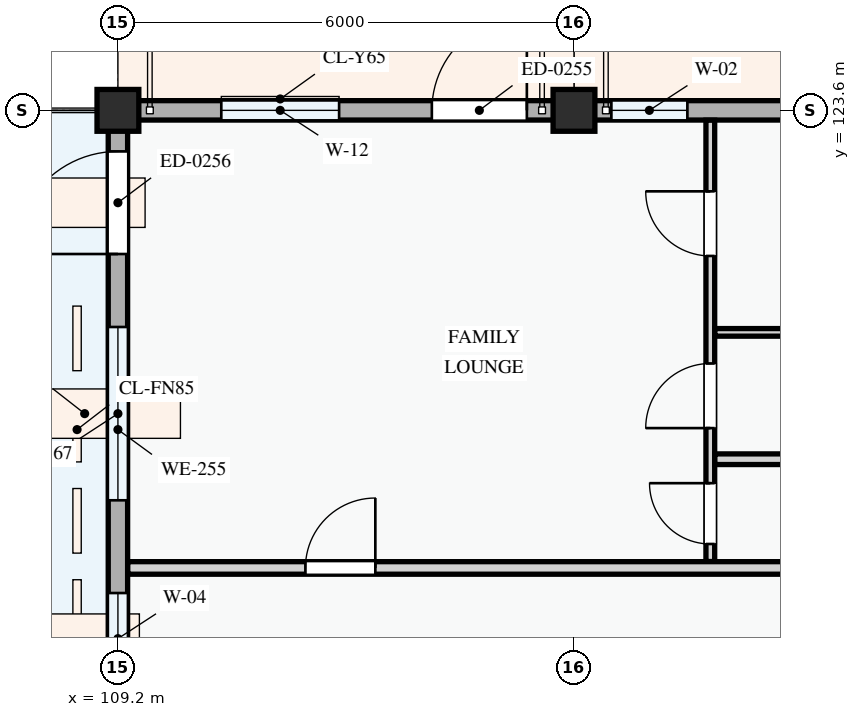
"""IFC4 building model, lengths in metres.
Left out: names, types, materials, properties, quantities, classifications, styles, units other than length and angle.
Written with IfcOpenShell. Run it as: python <this file> out.ifc"""

import sys

from ifc_helpers import new_model, si_unit, direction, frame, frame_2d, origin, origin_2d, place, context, subcontext, project, spatial, rectangle, extrude, element, fill, save


model = new_model("IFC4")
c1 = context("Model", 3, precision=1e-05, world=origin(), true_north=direction((0.0, 1.0)))
c2 = subcontext(c1, "Body", "Model", "MODEL_VIEW")
j1 = project(units=[si_unit("LENGTHUNIT", "METRE"), si_unit("PLANEANGLEUNIT", "RADIAN")], contexts=[c1])
p1 = place(None, origin())
s1 = spatial("IfcSite", under=j1, at=p1, CompositionType="ELEMENT")
p2 = place(p1, origin())
s2 = spatial("IfcBuilding", under=s1, at=p2, CompositionType="ELEMENT")
p3 = place(p2, frame((0.0, 0.0, 34.5)))
s3 = spatial("IfcBuildingStorey", under=s2, at=p3, CompositionType="ELEMENT", Elevation=34.5)
for number, where, z_axis, x_axis in (
    (1, (109.2, 123.6, 0.0), (0.0, 0.0, 1.0), (1.0, 0.0, 0.0)),
    (2, (115.2, 123.6, 0.0), (0.0, 0.0, 1.0), (1.0, 0.0, 0.0)),
):
    element("IfcColumn", number, at=place(p3, frame(where, z_axis=z_axis, x_axis=x_axis)), inside=s3, PredefinedType="COLUMN", context=c2, shape_type="SweptSolid", body=[
        extrude(rectangle(XDim=0.55, YDim=0.55, at=origin_2d()), origin(), (0.0, 0.0, 1.0), 3.3),
    ])
p4 = place(p3, frame((123.6, 123.6, 0.0), z_axis=(0.0, 0.0, 1.0), x_axis=(-1.0, 0.0, 0.0)))
e3 = element("IfcWall", 3, at=p4, inside=s3, PredefinedType="STANDARD", context=c2, shape_type="SweptSolid", body=[
    extrude(rectangle(XDim=8.4, YDim=0.255, at=frame_2d((4.2, 0.0))), origin(), (0.0, 0.0, 1.0), 2.345),
])
p5 = place(p4, frame((2.1, 0.0, 0.0)))
e4 = element("IfcOpeningElement", 4, at=p5, cuts=e3, PredefinedType="OPENING", context=c2, shape_type="SweptSolid", body=[
    extrude(rectangle(XDim=1.2, YDim=2.15, at=frame_2d((0.6, 1.075))), frame((0.0, 0.137, 0.0), z_axis=(0.0, -1.0, 0.0), x_axis=(1.0, 0.0, 0.0)), (0.0, 0.0, 1.0), 0.275),
])
p6 = place(p4, frame((0.53, 0.0, 0.78)))
e5 = element("IfcOpeningElement", 5, at=p6, cuts=e3, PredefinedType="OPENING", context=c2, shape_type="SweptSolid", body=[
    extrude(rectangle(XDim=0.9, YDim=1.2, at=frame_2d((0.45, 0.6))), frame((0.0, 0.137, 0.0), z_axis=(0.0, -1.0, 0.0), x_axis=(1.0, 0.0, 0.0)), (0.0, 0.0, 1.0), 0.275),
])
p7 = place(p4, frame((4.503, 0.0, 0.78)))
e6 = element("IfcOpeningElement", 6, at=p7, cuts=e3, PredefinedType="OPENING", context=c2, shape_type="SweptSolid", body=[
    extrude(rectangle(XDim=0.95, YDim=1.15, at=frame_2d((0.475, 0.575))), frame((0.0, 0.137, 0.0), z_axis=(0.0, -1.0, 0.0), x_axis=(1.0, 0.0, 0.0)), (0.0, 0.0, 1.0), 0.275),
])
p8 = place(p4, frame((6.908, 0.0, 0.78)))
e7 = element("IfcOpeningElement", 7, at=p8, cuts=e3, PredefinedType="OPENING", context=c2, shape_type="SweptSolid", body=[
    extrude(rectangle(XDim=1.0, YDim=1.25, at=frame_2d((0.5, 0.625))), frame((0.0, 0.137, 0.0), z_axis=(0.0, -1.0, 0.0), x_axis=(1.0, 0.0, 0.0)), (0.0, 0.0, 1.0), 0.275),
])
p9 = place(p3, frame((115.2, 123.6, 0.0), z_axis=(0.0, 0.0, 1.0), x_axis=(-1.0, 0.0, 0.0)))
e8 = element("IfcWall", 8, at=p9, inside=s3, PredefinedType="STANDARD", context=c2, shape_type="SweptSolid", body=[
    extrude(rectangle(XDim=6.0, YDim=0.255, at=frame_2d((3.0, 0.0))), origin(), (0.0, 0.0, 1.0), 2.445),
])
p10 = place(p9, frame((0.62, 0.0, 0.0)))
e9 = element("IfcOpeningElement", 9, at=p10, cuts=e8, PredefinedType="OPENING", context=c2, shape_type="SweptSolid", body=[
    extrude(rectangle(XDim=1.25, YDim=2.2, at=frame_2d((0.625, 1.1))), frame((0.0, 0.137, 0.0), z_axis=(0.0, -1.0, 0.0), x_axis=(1.0, 0.0, 0.0)), (0.0, 0.0, 1.0), 0.275),
])
p11 = place(p9, frame((3.09, 0.0, 0.78)))
e10 = element("IfcOpeningElement", 10, at=p11, cuts=e8, PredefinedType="OPENING", context=c2, shape_type="SweptSolid", body=[
    extrude(rectangle(XDim=1.55, YDim=1.4, at=frame_2d((0.775, 0.7))), frame((0.0, 0.137, 0.0), z_axis=(0.0, -1.0, 0.0), x_axis=(1.0, 0.0, 0.0)), (0.0, 0.0, 1.0), 0.275),
])
p12 = place(p3, frame((109.2, 123.6, 0.0), z_axis=(0.0, 0.0, 1.0), x_axis=(0.0, -1.0, 0.0)))
e11 = element("IfcWall", 11, at=p12, inside=s3, PredefinedType="STANDARD", context=c2, shape_type="SweptSolid", body=[
    extrude(rectangle(XDim=8.4, YDim=0.255, at=frame_2d((4.2, 0.0))), origin(), (0.0, 0.0, 1.0), 2.425),
])
p13 = place(p12, frame((0.54, 0.0, 0.0)))
e12 = element("IfcOpeningElement", 12, at=p13, cuts=e11, PredefinedType="OPENING", context=c2, shape_type="SweptSolid", body=[
    extrude(rectangle(XDim=1.35, YDim=2.2, at=frame_2d((0.675, 1.1))), frame((0.0, 0.137, 0.0), z_axis=(0.0, -1.0, 0.0), x_axis=(1.0, 0.0, 0.0)), (0.0, 0.0, 1.0), 0.275),
])
p14 = place(p12, frame((2.85, 0.0, 0.78)))
e13 = element("IfcOpeningElement", 13, at=p14, cuts=e11, PredefinedType="OPENING", context=c2, shape_type="SweptSolid", body=[
    extrude(rectangle(XDim=2.28, YDim=1.46, at=frame_2d((1.14, 0.73))), frame((0.0, 0.137, 0.0), z_axis=(0.0, -1.0, 0.0), x_axis=(1.0, 0.0, 0.0)), (0.0, 0.0, 1.0), 0.275),
])
p15 = place(p12, frame((6.35, 0.0, 0.78)))
e14 = element("IfcOpeningElement", 14, at=p15, cuts=e11, PredefinedType="OPENING", context=c2, shape_type="SweptSolid", body=[
    extrude(rectangle(XDim=1.2, YDim=1.35, at=frame_2d((0.6, 0.675))), frame((0.0, 0.137, 0.0), z_axis=(0.0, -1.0, 0.0), x_axis=(1.0, 0.0, 0.0)), (0.0, 0.0, 1.0), 0.275),
])
p16 = place(p3, frame((116.994, 117.665, 0.0), z_axis=(0.0, 0.0, 1.0), x_axis=(0.0, 1.0, 0.0)))
e15 = element("IfcWall", 15, at=p16, inside=s3, PredefinedType="PARTITIONING", context=c2, shape_type="SweptSolid", body=[
    extrude(rectangle(XDim=5.806, YDim=0.115, at=frame_2d((2.903, 0.0))), origin(), (0.0, 0.0, 1.0), 3.0),
])
p17 = place(p16, frame((0.231, 0.0, 0.0)))
e16 = element("IfcOpeningElement", 16, at=p17, cuts=e15, PredefinedType="OPENING", context=c2, shape_type="SweptSolid", body=[
    extrude(rectangle(XDim=0.8, YDim=2.1, at=frame_2d((0.4, 1.05))), frame((0.0, 0.067, 0.0), z_axis=(0.0, -1.0, 0.0), x_axis=(1.0, 0.0, 0.0)), (0.0, 0.0, 1.0), 0.135),
])
p18 = place(p16, frame((1.755, 0.0, 0.0)))
e17 = element("IfcOpeningElement", 17, at=p18, cuts=e15, PredefinedType="OPENING", context=c2, shape_type="SweptSolid", body=[
    extrude(rectangle(XDim=0.85, YDim=2.1, at=frame_2d((0.425, 1.05))), frame((0.0, 0.067, 0.0), z_axis=(0.0, -1.0, 0.0), x_axis=(1.0, 0.0, 0.0)), (0.0, 0.0, 1.0), 0.135),
])
p19 = place(p16, frame((4.02, 0.0, 0.0)))
e18 = element("IfcOpeningElement", 18, at=p19, cuts=e15, PredefinedType="OPENING", context=c2, shape_type="SweptSolid", body=[
    extrude(rectangle(XDim=0.85, YDim=2.1, at=frame_2d((0.425, 1.05))), frame((0.0, 0.067, 0.0), z_axis=(0.0, -1.0, 0.0), x_axis=(1.0, 0.0, 0.0)), (0.0, 0.0, 1.0), 0.135),
])
p20 = place(p3, frame((117.053, 120.679, 0.0), z_axis=(0.0, 0.0, 1.0), x_axis=(1.0, 0.0, 0.0)))
e19 = element("IfcWall", 19, at=p20, inside=s3, PredefinedType="PARTITIONING", context=c2, shape_type="SweptSolid", body=[
    extrude(rectangle(XDim=4.675, YDim=0.1, at=frame_2d((2.337, 0.0))), origin(), (0.0, 0.0, 1.0), 3.0),
])
p21 = place(p3, frame((117.053, 119.01, 0.0), z_axis=(0.0, 0.0, 1.0), x_axis=(1.0, 0.0, 0.0)))
e20 = element("IfcWall", 20, at=p21, inside=s3, PredefinedType="PARTITIONING", context=c2, shape_type="SweptSolid", body=[
    extrude(rectangle(XDim=4.675, YDim=0.14, at=frame_2d((2.337, 0.0))), origin(), (0.0, 0.0, 1.0), 3.0),
])
p22 = place(p3, frame((109.33, 117.58, 0.0), z_axis=(0.0, 0.0, 1.0), x_axis=(1.0, 0.0, 0.0)))
e21 = element("IfcWall", 21, at=p22, inside=s3, PredefinedType="PARTITIONING", context=c2, shape_type="SweptSolid", body=[
    extrude(rectangle(XDim=43.21, YDim=0.165, at=frame_2d((21.605, 0.0))), origin(), (0.0, 0.0, 1.0), 3.0),
])
p23 = place(p22, frame((2.337, 0.0, 0.0)))
e22 = element("IfcOpeningElement", 22, at=p23, cuts=e21, PredefinedType="OPENING", context=c2, shape_type="SweptSolid", body=[
    extrude(rectangle(XDim=0.92, YDim=2.1, at=frame_2d((0.46, 1.05))), frame((0.0, 0.093, 0.0), z_axis=(0.0, -1.0, 0.0), x_axis=(1.0, 0.0, 0.0)), (0.0, 0.0, 1.0), 0.185),
])
p24 = place(p22, frame((16.721, 0.0, 0.0)))
e23 = element("IfcOpeningElement", 23, at=p24, cuts=e21, PredefinedType="OPENING", context=c2, shape_type="SweptSolid", body=[
    extrude(rectangle(XDim=0.92, YDim=2.1, at=frame_2d((0.46, 1.05))), frame((0.0, 0.093, 0.0), z_axis=(0.0, -1.0, 0.0), x_axis=(1.0, 0.0, 0.0)), (0.0, 0.0, 1.0), 0.185),
])
p25 = place(p22, frame((31.135, 0.0, 0.0)))
e24 = element("IfcOpeningElement", 24, at=p25, cuts=e21, PredefinedType="OPENING", context=c2, shape_type="SweptSolid", body=[
    extrude(rectangle(XDim=0.92, YDim=2.1, at=frame_2d((0.46, 1.05))), frame((0.0, 0.093, 0.0), z_axis=(0.0, -1.0, 0.0), x_axis=(1.0, 0.0, 0.0)), (0.0, 0.0, 1.0), 0.185),
])
p26 = place(p8, origin())
e25 = element("IfcWindow", 25, at=p26, inside=s3, PartitioningType="SINGLE_PANEL", PredefinedType="WINDOW", context=c2, shape_type="SweptSolid", body=[
    extrude(rectangle(XDim=1.0, YDim=1.25, at=frame_2d((0.5, 0.625))), frame((0.0, 0.03, 0.0), z_axis=(0.0, -1.0, 0.0), x_axis=(1.0, 0.0, 0.0)), (0.0, 0.0, 1.0), 0.06),
])
fill(e7, e25)
p27 = place(p10, frame((1.25, 0.0, 0.0), z_axis=(0.0, 0.0, 1.0), x_axis=(-1.0, 0.0, 0.0)))
e26 = element("IfcDoor", 26, at=p27, inside=s3, OperationType="SINGLE_SWING_RIGHT", PredefinedType="DOOR", context=c2, shape_type="SweptSolid", body=[
    extrude(rectangle(XDim=1.25, YDim=2.2, at=frame_2d((0.625, 1.1))), frame((0.0, 0.025, 0.0), z_axis=(0.0, -1.0, 0.0), x_axis=(1.0, 0.0, 0.0)), (0.0, 0.0, 1.0), 0.05),
])
fill(e9, e26)
p28 = place(p11, origin())
e27 = element("IfcWindow", 27, at=p28, inside=s3, PartitioningType="SINGLE_PANEL", PredefinedType="WINDOW", context=c2, shape_type="SweptSolid", body=[
    extrude(rectangle(XDim=1.55, YDim=1.4, at=frame_2d((0.775, 0.7))), frame((0.0, 0.03, 0.0), z_axis=(0.0, -1.0, 0.0), x_axis=(1.0, 0.0, 0.0)), (0.0, 0.0, 1.0), 0.06),
])
fill(e10, e27)
p29 = place(p13, frame((1.35, 0.0, 0.0), z_axis=(0.0, 0.0, 1.0), x_axis=(-1.0, 0.0, 0.0)))
e28 = element("IfcDoor", 28, at=p29, inside=s3, OperationType="SINGLE_SWING_LEFT", PredefinedType="DOOR", context=c2, shape_type="SweptSolid", body=[
    extrude(rectangle(XDim=1.35, YDim=2.2, at=frame_2d((0.675, 1.1))), frame((0.0, 0.025, 0.0), z_axis=(0.0, -1.0, 0.0), x_axis=(1.0, 0.0, 0.0)), (0.0, 0.0, 1.0), 0.05),
])
fill(e12, e28)
p30 = place(p14, origin())
e29 = element("IfcWindow", 29, at=p30, inside=s3, PartitioningType="DOUBLE_PANEL_VERTICAL", PredefinedType="WINDOW", context=c2, shape_type="SweptSolid", body=[
    extrude(rectangle(XDim=2.28, YDim=1.46, at=frame_2d((1.14, 0.73))), frame((0.0, 0.03, 0.0), z_axis=(0.0, -1.0, 0.0), x_axis=(1.0, 0.0, 0.0)), (0.0, 0.0, 1.0), 0.06),
])
fill(e13, e29)
p31 = place(p15, origin())
e30 = element("IfcWindow", 30, at=p31, inside=s3, PartitioningType="SINGLE_PANEL", PredefinedType="WINDOW", context=c2, shape_type="SweptSolid", body=[
    extrude(rectangle(XDim=1.2, YDim=1.35, at=frame_2d((0.6, 0.675))), frame((0.0, 0.03, 0.0), z_axis=(0.0, -1.0, 0.0), x_axis=(1.0, 0.0, 0.0)), (0.0, 0.0, 1.0), 0.06),
])
fill(e14, e30)
p32 = place(p17, origin())
e31 = element("IfcDoor", 31, at=p32, inside=s3, OperationType="SINGLE_SWING_RIGHT", PredefinedType="DOOR", context=c2, shape_type="SweptSolid", body=[
    extrude(rectangle(XDim=0.8, YDim=2.1, at=frame_2d((0.4, 1.05))), frame((0.0, 0.025, 0.0), z_axis=(0.0, -1.0, 0.0), x_axis=(1.0, 0.0, 0.0)), (0.0, 0.0, 1.0), 0.05),
])
fill(e16, e31)
p33 = place(p18, origin())
e32 = element("IfcDoor", 32, at=p33, inside=s3, OperationType="SINGLE_SWING_LEFT", PredefinedType="DOOR", context=c2, shape_type="SweptSolid", body=[
    extrude(rectangle(XDim=0.85, YDim=2.1, at=frame_2d((0.425, 1.05))), frame((0.0, 0.025, 0.0), z_axis=(0.0, -1.0, 0.0), x_axis=(1.0, 0.0, 0.0)), (0.0, 0.0, 1.0), 0.05),
])
fill(e17, e32)
p34 = place(p19, origin())
e33 = element("IfcDoor", 33, at=p34, inside=s3, OperationType="SINGLE_SWING_RIGHT", PredefinedType="DOOR", context=c2, shape_type="SweptSolid", body=[
    extrude(rectangle(XDim=0.85, YDim=2.1, at=frame_2d((0.425, 1.05))), frame((0.0, 0.025, 0.0), z_axis=(0.0, -1.0, 0.0), x_axis=(1.0, 0.0, 0.0)), (0.0, 0.0, 1.0), 0.05),
])
fill(e18, e33)
p35 = place(p23, origin())
e34 = element("IfcDoor", 34, at=p35, inside=s3, OperationType="SINGLE_SWING_RIGHT", PredefinedType="DOOR", context=c2, shape_type="SweptSolid", body=[
    extrude(rectangle(XDim=0.92, YDim=2.1, at=frame_2d((0.46, 1.05))), frame((0.0, 0.025, 0.0), z_axis=(0.0, -1.0, 0.0), x_axis=(1.0, 0.0, 0.0)), (0.0, 0.0, 1.0), 0.05),
])
fill(e22, e34)
save(model, sys.argv[1])
